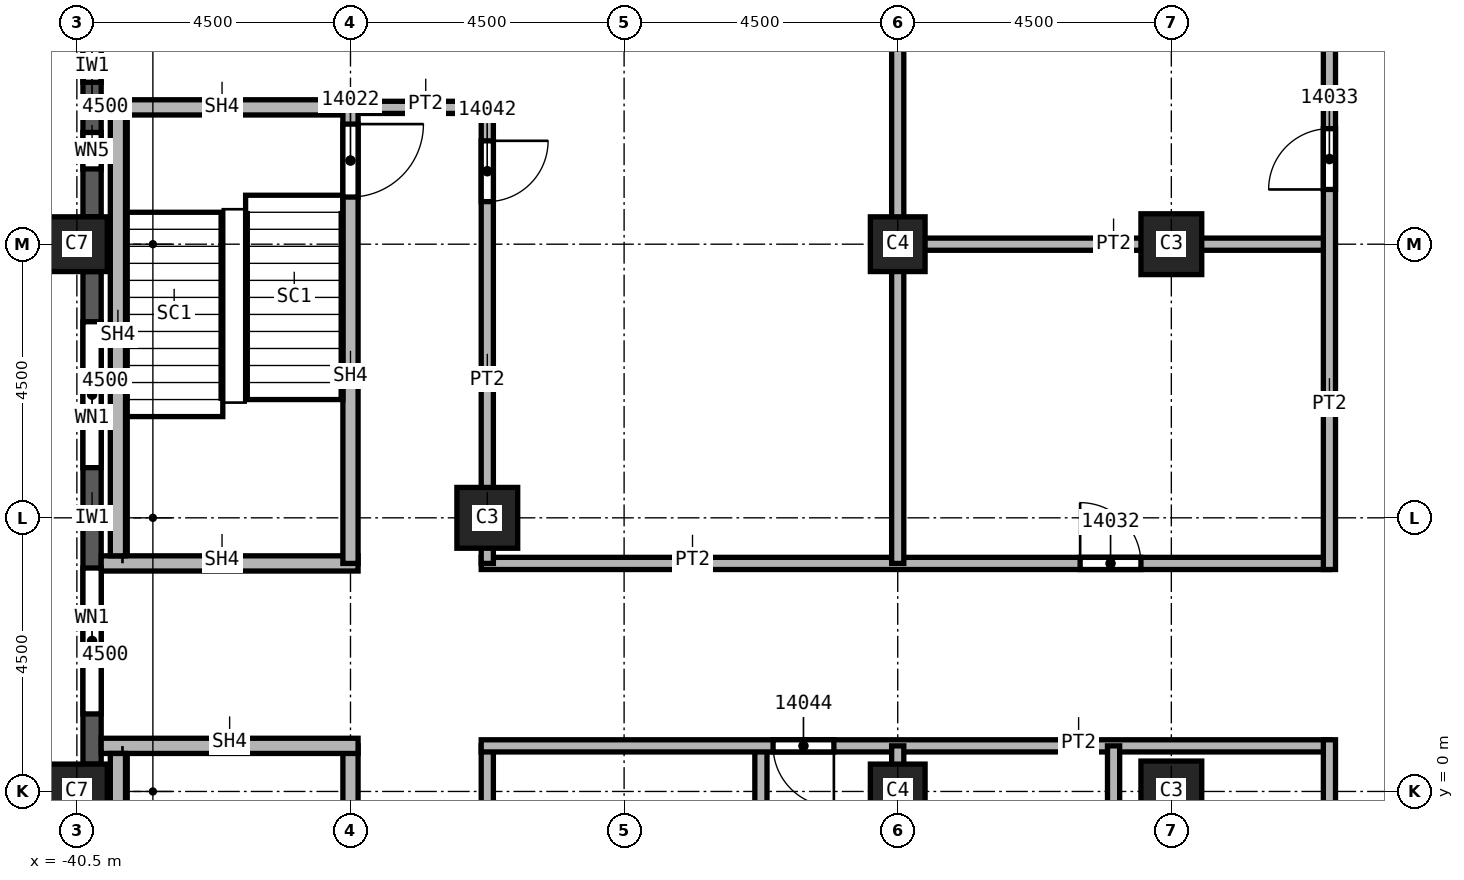
"""IFC4 building model, lengths in metres.
Left out: names, types, materials, properties, quantities, classifications, styles, units other than length and angle.
Written with IfcOpenShell. Run it as: python <this file> out.ifc"""

import sys

from ifc_helpers import new_model, si_unit, direction, frame, frame_2d, origin, origin_2d, place, context, subcontext, project, spatial, rectangle, extrude, element, fill, save


model = new_model("IFC4")
c1 = context("Model", 3, precision=1e-05, world=origin(), true_north=direction((0.0, 1.0)))
c2 = subcontext(c1, "Body", "Model", "MODEL_VIEW")
j1 = project(units=[si_unit("LENGTHUNIT", "METRE"), si_unit("PLANEANGLEUNIT", "RADIAN")], contexts=[c1])
p1 = place(None, origin())
s1 = spatial("IfcSite", under=j1, at=p1, CompositionType="ELEMENT")
p2 = place(p1, origin())
s2 = spatial("IfcBuilding", under=s1, at=p2, CompositionType="ELEMENT")
p3 = place(p2, frame((0.0, 0.0, 220.0)))
s3 = spatial("IfcBuildingStorey", under=s2, at=p3, CompositionType="ELEMENT", Elevation=220.0)
for number, where, z_axis, x_axis in (
    (1, (-40.5, 0.0, 0.0), (0.0, 0.0, 1.0), (0.0, 1.0, 0.0)),
    (2, (-40.5, 9.0, 0.0), (0.0, 0.0, 1.0), (0.0, 1.0, 0.0)),
):
    element("IfcColumn", number, at=place(p3, frame(where, z_axis=z_axis, x_axis=x_axis)), inside=s3, PredefinedType="COLUMN", context=c2, shape_type="SweptSolid", body=[
        extrude(rectangle(XDim=0.9, YDim=1.0, at=origin_2d()), origin(), (0.0, 0.0, 1.0), 3.72),
    ])
for number, where, z_axis, x_axis in (
    (3, (-33.75, 4.5, 0.0), (0.0, 0.0, 1.0), (1.0, 0.0, 0.0)),
    (4, (-22.5, 0.0, 0.0), (0.0, 0.0, 1.0), (1.0, 0.0, 0.0)),
    (5, (-22.5, 9.0, 0.0), (0.0, 0.0, 1.0), (1.0, 0.0, 0.0)),
):
    element("IfcColumn", number, at=place(p3, frame(where, z_axis=z_axis, x_axis=x_axis)), inside=s3, PredefinedType="COLUMN", context=c2, shape_type="SweptSolid", body=[
        extrude(rectangle(XDim=1.0, YDim=1.0, at=origin_2d()), origin(), (0.0, 0.0, 1.0), 3.72),
    ])
for number, where, z_axis, x_axis in (
    (6, (-27.0, 0.0, 0.0), (0.0, 0.0, 1.0), (1.0, 0.0, 0.0)),
    (7, (-27.0, 9.0, 0.0), (0.0, 0.0, 1.0), (1.0, 0.0, 0.0)),
):
    element("IfcColumn", number, at=place(p3, frame(where, z_axis=z_axis, x_axis=x_axis)), inside=s3, PredefinedType="COLUMN", context=c2, shape_type="SweptSolid", body=[
        extrude(rectangle(XDim=0.9, YDim=0.9, at=origin_2d()), origin(), (0.0, 0.0, 1.0), 3.72),
    ])
p4 = place(p3, frame((-40.25, 13.05, 0.0), z_axis=(0.0, 0.0, 1.0), x_axis=(0.0, -1.0, 0.0)))
e8 = element("IfcWall", 8, at=p4, inside=s3, PredefinedType="SOLIDWALL", context=c2, shape_type="SweptSolid", body=[
    extrude(rectangle(XDim=3.6, YDim=0.3, at=frame_2d((1.8, 0.0))), origin(), (0.0, 0.0, 1.0), 3.12),
])
p5 = place(p4, frame((0.788, 0.0, 0.8)))
e9 = element("IfcOpeningElement", 9, at=p5, cuts=e8, PredefinedType="OPENING", context=c2, shape_type="SweptSolid", body=[
    extrude(rectangle(XDim=0.6, YDim=1.95, at=frame_2d((0.3, 0.975))), frame((0.0, 0.15, 0.0), z_axis=(0.0, -1.0, 0.0), x_axis=(1.0, 0.0, 0.0)), (0.0, 0.0, 1.0), 0.3),
])
p6 = place(p4, frame((2.212, 0.0, 0.8)))
e10 = element("IfcOpeningElement", 10, at=p6, cuts=e8, PredefinedType="OPENING", context=c2, shape_type="SweptSolid", body=[
    extrude(rectangle(XDim=0.6, YDim=1.95, at=frame_2d((0.3, 0.975))), frame((0.0, 0.15, 0.0), z_axis=(0.0, -1.0, 0.0), x_axis=(1.0, 0.0, 0.0)), (0.0, 0.0, 1.0), 0.3),
])
p7 = place(p3, frame((-40.25, 8.55, 0.0), z_axis=(0.0, 0.0, 1.0), x_axis=(0.0, -1.0, 0.0)))
e11 = element("IfcWall", 11, at=p7, inside=s3, PredefinedType="SOLIDWALL", context=c2, shape_type="SweptSolid", body=[
    extrude(rectangle(XDim=8.1, YDim=0.3, at=frame_2d((4.05, 0.0))), origin(), (0.0, 0.0, 1.0), 3.12),
])
p8 = place(p7, frame((0.825, 0.0, 0.8)))
e12 = element("IfcOpeningElement", 12, at=p8, cuts=e11, PredefinedType="OPENING", context=c2, shape_type="SweptSolid", body=[
    extrude(rectangle(XDim=2.4, YDim=1.95, at=frame_2d((1.2, 0.975))), frame((0.0, 0.15, 0.0), z_axis=(0.0, -1.0, 0.0), x_axis=(1.0, 0.0, 0.0)), (0.0, 0.0, 1.0), 0.3),
])
p9 = place(p7, frame((4.875, 0.0, 0.8)))
e13 = element("IfcOpeningElement", 13, at=p9, cuts=e11, PredefinedType="OPENING", context=c2, shape_type="SweptSolid", body=[
    extrude(rectangle(XDim=2.4, YDim=1.95, at=frame_2d((1.2, 0.975))), frame((0.0, 0.15, 0.0), z_axis=(0.0, -1.0, 0.0), x_axis=(1.0, 0.0, 0.0)), (0.0, 0.0, 1.0), 0.3),
])
p10 = place(p3, frame((-36.0, 11.25, 0.0), z_axis=(0.0, 0.0, 1.0), x_axis=(1.0, 0.0, 0.0)))
e14 = element("IfcWall", 14, at=p10, inside=s3, PredefinedType="PARTITIONING", context=c2, shape_type="SweptSolid", body=[
    extrude(rectangle(XDim=2.35, YDim=0.2, at=frame_2d((1.175, 0.0))), origin(), (0.0, 0.0, 1.0), 3.72),
])
p11 = place(p3, frame((-33.85, 3.75, 0.0), z_axis=(0.0, 0.0, 1.0), x_axis=(1.0, 0.0, 0.0)))
e15 = element("IfcWall", 15, at=p11, inside=s3, PredefinedType="PARTITIONING", context=c2, shape_type="SweptSolid", body=[
    extrude(rectangle(XDim=13.95, YDim=0.2, at=frame_2d((6.975, 0.0))), origin(), (0.0, 0.0, 1.0), 3.72),
])
p12 = place(p11, frame((9.85, 0.0, 0.0)))
e16 = element("IfcOpeningElement", 16, at=p12, cuts=e15, PredefinedType="OPENING", context=c2, shape_type="SweptSolid", body=[
    extrude(rectangle(XDim=1.0, YDim=2.1, at=frame_2d((0.5, 1.05))), frame((0.0, 0.1, 0.0), z_axis=(0.0, -1.0, 0.0), x_axis=(1.0, 0.0, 0.0)), (0.0, 0.0, 1.0), 0.2),
])
p13 = place(p3, frame((-33.75, 0.75, 0.0), z_axis=(0.0, 0.0, 1.0), x_axis=(0.0, -1.0, 0.0)))
e17 = element("IfcWall", 17, at=p13, inside=s3, PredefinedType="PARTITIONING", context=c2, shape_type="SweptSolid", body=[
    extrude(rectangle(XDim=7.6, YDim=0.2, at=frame_2d((3.8, 0.0))), origin(), (0.0, 0.0, 1.0), 3.72),
])
p14 = place(p13, frame((6.1, 0.0, 0.0)))
e18 = element("IfcOpeningElement", 18, at=p14, cuts=e17, PredefinedType="OPENING", context=c2, shape_type="SweptSolid", body=[
    extrude(rectangle(XDim=1.0, YDim=2.1, at=frame_2d((0.5, 1.05))), frame((0.0, 0.1, 0.0), z_axis=(0.0, -1.0, 0.0), x_axis=(1.0, 0.0, 0.0)), (0.0, 0.0, 1.0), 0.2),
])
p15 = place(p3, frame((-33.75, 11.25, 0.0), z_axis=(0.0, 0.0, 1.0), x_axis=(0.0, -1.0, 0.0)))
e19 = element("IfcWall", 19, at=p15, inside=s3, PredefinedType="PARTITIONING", context=c2, shape_type="SweptSolid", body=[
    extrude(rectangle(XDim=7.5, YDim=0.2, at=frame_2d((3.75, 0.0))), origin(), (0.0, 0.0, 1.0), 3.72),
])
p16 = place(p15, frame((0.55, 0.0, 0.0)))
e20 = element("IfcOpeningElement", 20, at=p16, cuts=e19, PredefinedType="OPENING", context=c2, shape_type="SweptSolid", body=[
    extrude(rectangle(XDim=1.0, YDim=2.1, at=frame_2d((0.5, 1.05))), frame((0.0, 0.1, 0.0), z_axis=(0.0, -1.0, 0.0), x_axis=(1.0, 0.0, 0.0)), (0.0, 0.0, 1.0), 0.2),
])
p17 = place(p3, frame((-29.25, 0.75, 0.0), z_axis=(0.0, 0.0, 1.0), x_axis=(0.0, -1.0, 0.0)))
e21 = element("IfcWall", 21, at=p17, inside=s3, PredefinedType="PARTITIONING", context=c2, shape_type="SweptSolid", body=[
    extrude(rectangle(XDim=18.35, YDim=0.2, at=frame_2d((9.175, 0.0))), origin(), (0.0, 0.0, 1.0), 3.72),
])
p18 = place(p3, frame((-19.9, 0.75, 0.0), z_axis=(0.0, 0.0, 1.0), x_axis=(-1.0, 0.0, 0.0)))
e22 = element("IfcWall", 22, at=p18, inside=s3, PredefinedType="PARTITIONING", context=c2, shape_type="SweptSolid", body=[
    extrude(rectangle(XDim=13.95, YDim=0.2, at=frame_2d((6.975, 0.0))), origin(), (0.0, 0.0, 1.0), 3.72),
])
p19 = place(p18, frame((8.15, 0.0, 0.0)))
e23 = element("IfcOpeningElement", 23, at=p19, cuts=e22, PredefinedType="OPENING", context=c2, shape_type="SweptSolid", body=[
    extrude(rectangle(XDim=1.0, YDim=2.1, at=frame_2d((0.5, 1.05))), frame((0.0, 0.1, 0.0), z_axis=(0.0, -1.0, 0.0), x_axis=(1.0, 0.0, 0.0)), (0.0, 0.0, 1.0), 0.2),
])
p20 = place(p3, frame((-27.1, 9.0, 0.0), z_axis=(0.0, 0.0, 1.0), x_axis=(1.0, 0.0, 0.0)))
e24 = element("IfcWall", 24, at=p20, inside=s3, PredefinedType="PARTITIONING", context=c2, shape_type="SweptSolid", body=[
    extrude(rectangle(XDim=7.2, YDim=0.2, at=frame_2d((3.6, 0.0))), origin(), (0.0, 0.0, 1.0), 3.72),
])
p21 = place(p3, frame((-27.0, -17.5, 0.0), z_axis=(0.0, 0.0, 1.0), x_axis=(0.0, 1.0, 0.0)))
e25 = element("IfcWall", 25, at=p21, inside=s3, PredefinedType="PARTITIONING", context=c2, shape_type="SweptSolid", body=[
    extrude(rectangle(XDim=18.25, YDim=0.2, at=frame_2d((9.125, 0.0))), origin(), (0.0, 0.0, 1.0), 3.72),
])
p22 = place(p3, frame((-27.0, 3.75, 0.0), z_axis=(0.0, 0.0, 1.0), x_axis=(0.0, 1.0, 0.0)))
e26 = element("IfcWall", 26, at=p22, inside=s3, PredefinedType="PARTITIONING", context=c2, shape_type="SweptSolid", body=[
    extrude(rectangle(XDim=13.75, YDim=0.2, at=frame_2d((6.875, 0.0))), origin(), (0.0, 0.0, 1.0), 3.72),
])
p23 = place(p3, frame((-23.45, -19.9, 0.0), z_axis=(0.0, 0.0, 1.0), x_axis=(0.0, 1.0, 0.0)))
e27 = element("IfcWall", 27, at=p23, inside=s3, PredefinedType="PARTITIONING", context=c2, shape_type="SweptSolid", body=[
    extrude(rectangle(XDim=20.65, YDim=0.2, at=frame_2d((10.325, 0.0))), origin(), (0.0, 0.0, 1.0), 3.72),
])
p24 = place(p23, frame((2.65, 0.0, 0.0)))
e28 = element("IfcOpeningElement", 28, at=p24, cuts=e27, PredefinedType="OPENING", context=c2, shape_type="SweptSolid", body=[
    extrude(rectangle(XDim=1.0, YDim=2.1, at=frame_2d((0.5, 1.05))), frame((0.0, 0.1, 0.0), z_axis=(0.0, -1.0, 0.0), x_axis=(1.0, 0.0, 0.0)), (0.0, 0.0, 1.0), 0.2),
])
p25 = place(p23, frame((17.0, 0.0, 0.0)))
e29 = element("IfcOpeningElement", 29, at=p25, cuts=e27, PredefinedType="OPENING", context=c2, shape_type="SweptSolid", body=[
    extrude(rectangle(XDim=1.0, YDim=2.1, at=frame_2d((0.5, 1.05))), frame((0.0, 0.1, 0.0), z_axis=(0.0, -1.0, 0.0), x_axis=(1.0, 0.0, 0.0)), (0.0, 0.0, 1.0), 0.2),
])
p26 = place(p3, frame((-19.9, -22.4, 0.0), z_axis=(0.0, 0.0, 1.0), x_axis=(0.0, 1.0, 0.0)))
e30 = element("IfcWall", 30, at=p26, inside=s3, PredefinedType="PARTITIONING", context=c2, shape_type="SweptSolid", body=[
    extrude(rectangle(XDim=23.25, YDim=0.2, at=frame_2d((11.625, 0.0))), origin(), (0.0, 0.0, 1.0), 3.72),
])
p27 = place(p26, frame((4.45, 0.0, 0.0)))
e31 = element("IfcOpeningElement", 31, at=p27, cuts=e30, PredefinedType="OPENING", context=c2, shape_type="SweptSolid", body=[
    extrude(rectangle(XDim=1.0, YDim=2.1, at=frame_2d((0.5, 1.05))), frame((0.0, 0.1, 0.0), z_axis=(0.0, -1.0, 0.0), x_axis=(1.0, 0.0, 0.0)), (0.0, 0.0, 1.0), 0.2),
])
p28 = place(p26, frame((20.45, 0.0, 0.0)))
e32 = element("IfcOpeningElement", 32, at=p28, cuts=e30, PredefinedType="OPENING", context=c2, shape_type="SweptSolid", body=[
    extrude(rectangle(XDim=1.0, YDim=2.1, at=frame_2d((0.5, 1.05))), frame((0.0, 0.1, 0.0), z_axis=(0.0, -1.0, 0.0), x_axis=(1.0, 0.0, 0.0)), (0.0, 0.0, 1.0), 0.2),
])
p29 = place(p3, frame((-19.9, 3.65, 0.0), z_axis=(0.0, 0.0, 1.0), x_axis=(0.0, 1.0, 0.0)))
e33 = element("IfcWall", 33, at=p29, inside=s3, PredefinedType="PARTITIONING", context=c2, shape_type="SweptSolid", body=[
    extrude(rectangle(XDim=9.95, YDim=0.2, at=frame_2d((4.975, 0.0))), origin(), (0.0, 0.0, 1.0), 3.72),
])
p30 = place(p29, frame((6.25, 0.0, 0.0)))
e34 = element("IfcOpeningElement", 34, at=p30, cuts=e33, PredefinedType="OPENING", context=c2, shape_type="SweptSolid", body=[
    extrude(rectangle(XDim=1.0, YDim=2.1, at=frame_2d((0.5, 1.05))), frame((0.0, 0.1, 0.0), z_axis=(0.0, -1.0, 0.0), x_axis=(1.0, 0.0, 0.0)), (0.0, 0.0, 1.0), 0.2),
])
p31 = place(p3, frame((-40.1, 3.75, 0.0), z_axis=(0.0, 0.0, 1.0), x_axis=(1.0, 0.0, 0.0)))
e35 = element("IfcWall", 35, at=p31, inside=s3, PredefinedType="SOLIDWALL", context=c2, shape_type="SweptSolid", body=[
    extrude(rectangle(XDim=4.225, YDim=0.25, at=frame_2d((2.113, 0.0))), origin(), (0.0, 0.0, 1.0), 3.72),
])
p32 = place(p3, frame((-40.1, 11.25, 0.0), z_axis=(0.0, 0.0, 1.0), x_axis=(1.0, 0.0, 0.0)))
e36 = element("IfcWall", 36, at=p32, inside=s3, PredefinedType="SOLIDWALL", context=c2, shape_type="SweptSolid", body=[
    extrude(rectangle(XDim=4.1, YDim=0.25, at=frame_2d((2.05, 0.0))), origin(), (0.0, 0.0, 1.0), 3.72),
])
p33 = place(p3, frame((-36.0, 0.75, 0.0), z_axis=(0.0, 0.0, 1.0), x_axis=(0.0, -1.0, 0.0)))
e37 = element("IfcWall", 37, at=p33, inside=s3, PredefinedType="SOLIDWALL", context=c2, shape_type="SweptSolid", body=[
    extrude(rectangle(XDim=7.625, YDim=0.25, at=frame_2d((3.812, 0.0))), origin(), (0.0, 0.0, 1.0), 3.72),
])
p34 = place(p33, frame((5.95, 0.0, 0.0)))
e38 = element("IfcOpeningElement", 38, at=p34, cuts=e37, PredefinedType="OPENING", context=c2, shape_type="SweptSolid", body=[
    extrude(rectangle(XDim=1.2, YDim=2.1, at=frame_2d((0.6, 1.05))), frame((0.0, 0.125, 0.0), z_axis=(0.0, -1.0, 0.0), x_axis=(1.0, 0.0, 0.0)), (0.0, 0.0, 1.0), 0.25),
])
p35 = place(p3, frame((-36.0, 11.375, 0.0), z_axis=(0.0, 0.0, 1.0), x_axis=(0.0, -1.0, 0.0)))
e39 = element("IfcWall", 39, at=p35, inside=s3, PredefinedType="SOLIDWALL", context=c2, shape_type="SweptSolid", body=[
    extrude(rectangle(XDim=7.625, YDim=0.25, at=frame_2d((3.812, 0.0))), origin(), (0.0, 0.0, 1.0), 3.72),
])
p36 = place(p35, frame((0.4, 0.0, 0.0)))
e40 = element("IfcOpeningElement", 40, at=p36, cuts=e39, PredefinedType="OPENING", context=c2, shape_type="SweptSolid", body=[
    extrude(rectangle(XDim=1.2, YDim=2.1, at=frame_2d((0.6, 1.05))), frame((0.0, 0.125, 0.0), z_axis=(0.0, -1.0, 0.0), x_axis=(1.0, 0.0, 0.0)), (0.0, 0.0, 1.0), 0.25),
])
p37 = place(p3, frame((-35.875, 0.75, 0.0), z_axis=(0.0, 0.0, 1.0), x_axis=(-1.0, 0.0, 0.0)))
e41 = element("IfcWall", 41, at=p37, inside=s3, PredefinedType="SOLIDWALL", context=c2, shape_type="SweptSolid", body=[
    extrude(rectangle(XDim=4.225, YDim=0.25, at=frame_2d((2.113, 0.0))), origin(), (0.0, 0.0, 1.0), 3.72),
])
for number, where, z_axis, x_axis in (
    (42, (-39.825, 3.875, 0.0), (0.0, 0.0, 1.0), (0.0, 1.0, 0.0)),
    (43, (-39.825, -6.625, 0.0), (0.0, 0.0, 1.0), (0.0, 1.0, 0.0)),
):
    element("IfcWall", number, at=place(p3, frame(where, z_axis=z_axis, x_axis=x_axis)), inside=s3, PredefinedType="SOLIDWALL", context=c2, shape_type="SweptSolid", body=[
        extrude(rectangle(XDim=7.25, YDim=0.25, at=frame_2d((3.625, 0.0))), origin(), (0.0, 0.0, 1.0), 3.72),
    ])
p38 = place(p8, origin())
e44 = element("IfcWindow", 44, at=p38, inside=s3, PartitioningType="SINGLE_PANEL", PredefinedType="WINDOW", context=c2, shape_type="SweptSolid", body=[
    extrude(rectangle(XDim=2.4, YDim=1.95, at=frame_2d((1.2, 0.975))), frame((0.0, 0.03, 0.0), z_axis=(0.0, -1.0, 0.0), x_axis=(1.0, 0.0, 0.0)), (0.0, 0.0, 1.0), 0.06),
])
fill(e12, e44)
p39 = place(p9, origin())
e45 = element("IfcWindow", 45, at=p39, inside=s3, PartitioningType="SINGLE_PANEL", PredefinedType="WINDOW", context=c2, shape_type="SweptSolid", body=[
    extrude(rectangle(XDim=2.4, YDim=1.95, at=frame_2d((1.2, 0.975))), frame((0.0, 0.03, 0.0), z_axis=(0.0, -1.0, 0.0), x_axis=(1.0, 0.0, 0.0)), (0.0, 0.0, 1.0), 0.06),
])
fill(e13, e45)
p40 = place(p36, origin())
e46 = element("IfcDoor", 46, at=p40, inside=s3, OperationType="SINGLE_SWING_LEFT", PredefinedType="DOOR", context=c2, shape_type="SweptSolid", body=[
    extrude(rectangle(XDim=1.2, YDim=2.1, at=frame_2d((0.6, 1.05))), frame((0.0, 0.025, 0.0), z_axis=(0.0, -1.0, 0.0), x_axis=(1.0, 0.0, 0.0)), (0.0, 0.0, 1.0), 0.05),
])
fill(e40, e46)
p41 = place(p12, origin())
e47 = element("IfcDoor", 47, at=p41, inside=s3, OperationType="SINGLE_SWING_LEFT", PredefinedType="DOOR", context=c2, shape_type="SweptSolid", body=[
    extrude(rectangle(XDim=1.0, YDim=2.1, at=frame_2d((0.5, 1.05))), frame((0.0, 0.025, 0.0), z_axis=(0.0, -1.0, 0.0), x_axis=(1.0, 0.0, 0.0)), (0.0, 0.0, 1.0), 0.05),
])
fill(e16, e47)
p42 = place(p30, origin())
e48 = element("IfcDoor", 48, at=p42, inside=s3, OperationType="SINGLE_SWING_RIGHT", PredefinedType="DOOR", context=c2, shape_type="SweptSolid", body=[
    extrude(rectangle(XDim=1.0, YDim=2.1, at=frame_2d((0.5, 1.05))), frame((0.0, 0.025, 0.0), z_axis=(0.0, -1.0, 0.0), x_axis=(1.0, 0.0, 0.0)), (0.0, 0.0, 1.0), 0.05),
])
fill(e34, e48)
p43 = place(p16, origin())
e49 = element("IfcDoor", 49, at=p43, inside=s3, OperationType="SINGLE_SWING_LEFT", PredefinedType="DOOR", context=c2, shape_type="SweptSolid", body=[
    extrude(rectangle(XDim=1.0, YDim=2.1, at=frame_2d((0.5, 1.05))), frame((0.0, 0.025, 0.0), z_axis=(0.0, -1.0, 0.0), x_axis=(1.0, 0.0, 0.0)), (0.0, 0.0, 1.0), 0.05),
])
fill(e20, e49)
p44 = place(p19, origin())
e50 = element("IfcDoor", 50, at=p44, inside=s3, OperationType="SINGLE_SWING_LEFT", PredefinedType="DOOR", context=c2, shape_type="SweptSolid", body=[
    extrude(rectangle(XDim=1.0, YDim=2.1, at=frame_2d((0.5, 1.05))), frame((0.0, 0.025, 0.0), z_axis=(0.0, -1.0, 0.0), x_axis=(1.0, 0.0, 0.0)), (0.0, 0.0, 1.0), 0.05),
])
fill(e23, e50)
p45 = place(p5, origin())
e51 = element("IfcWindow", 51, at=p45, inside=s3, PartitioningType="SINGLE_PANEL", PredefinedType="WINDOW", context=c2, shape_type="SweptSolid", body=[
    extrude(rectangle(XDim=0.6, YDim=1.95, at=frame_2d((0.3, 0.975))), frame((0.0, 0.03, 0.0), z_axis=(0.0, -1.0, 0.0), x_axis=(1.0, 0.0, 0.0)), (0.0, 0.0, 1.0), 0.06),
])
fill(e9, e51)
p46 = place(p6, origin())
e52 = element("IfcWindow", 52, at=p46, inside=s3, PartitioningType="SINGLE_PANEL", PredefinedType="WINDOW", context=c2, shape_type="SweptSolid", body=[
    extrude(rectangle(XDim=0.6, YDim=1.95, at=frame_2d((0.3, 0.975))), frame((0.0, 0.03, 0.0), z_axis=(0.0, -1.0, 0.0), x_axis=(1.0, 0.0, 0.0)), (0.0, 0.0, 1.0), 0.06),
])
fill(e10, e52)
save(model, sys.argv[1])
